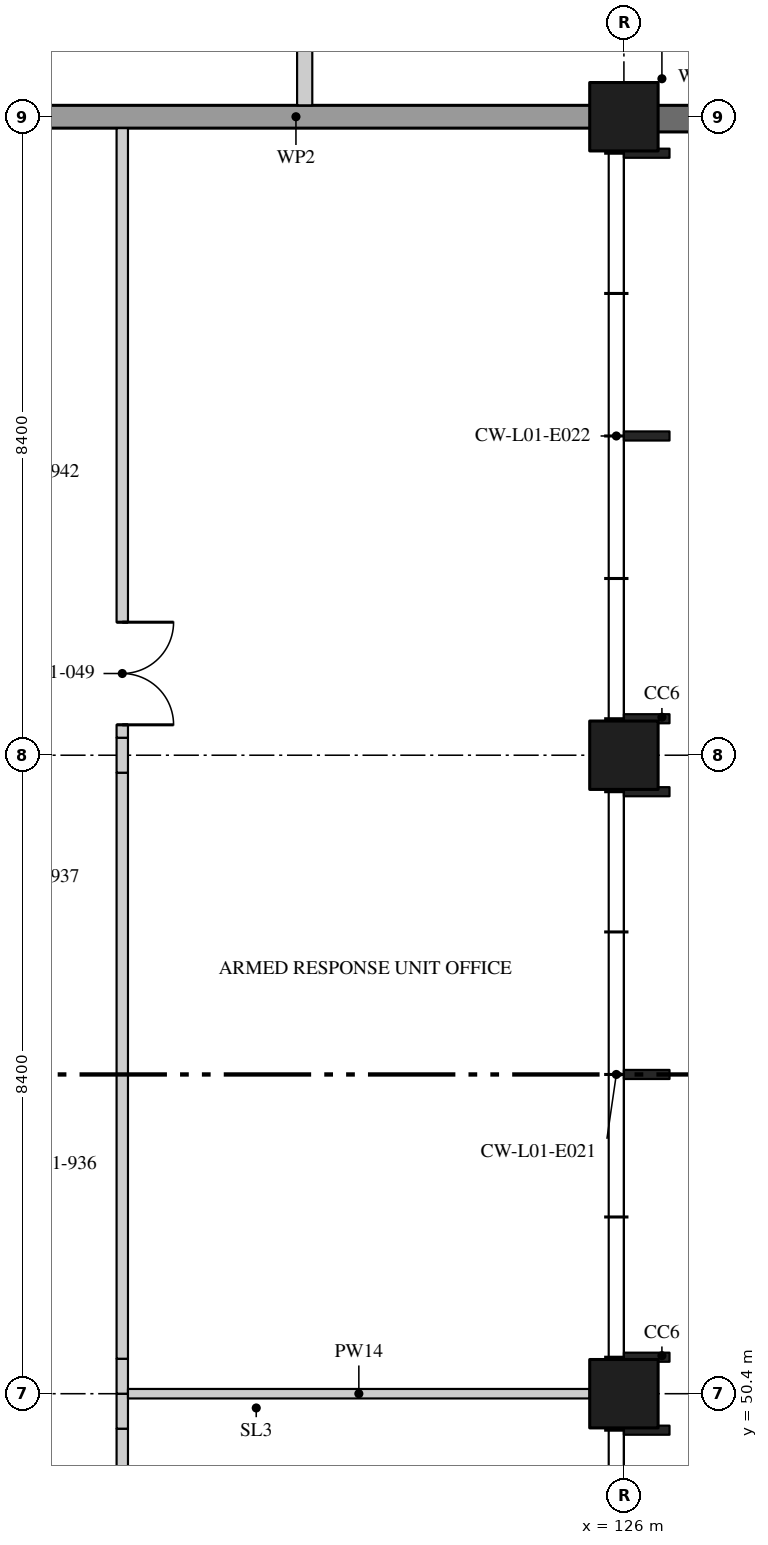
"""IFC4 building model, lengths in metres.
Left out: names, types, materials, properties, quantities, classifications, styles, units other than length and angle.
Written with IfcOpenShell. Run it as: python <this file> out.ifc"""

import sys

from ifc_helpers import new_model, si_unit, direction, frame, frame_2d, origin, origin_2d, place, context, subcontext, project, spatial, rectangle, extrude, element, fill, save


model = new_model("IFC4")
c1 = context("Model", 3, precision=1e-05, world=origin(), true_north=direction((0.0, 1.0)))
c2 = subcontext(c1, "Body", "Model", "MODEL_VIEW")
j1 = project(units=[si_unit("LENGTHUNIT", "METRE"), si_unit("PLANEANGLEUNIT", "RADIAN")], contexts=[c1])
p1 = place(None, origin())
s1 = spatial("IfcSite", under=j1, at=p1, CompositionType="ELEMENT")
p2 = place(p1, origin())
s2 = spatial("IfcBuilding", under=s1, at=p2, CompositionType="ELEMENT")
p3 = place(p2, frame((0.0, 0.0, 5.4)))
s3 = spatial("IfcBuildingStorey", under=s2, at=p3, CompositionType="ELEMENT", Elevation=5.4)
for number, where, z_axis, x_axis in (
    (1, (126.0, 50.4, 0.0), (0.0, 0.0, 1.0), (1.0, 0.0, 0.0)),
    (2, (126.0, 58.8, 0.0), (0.0, 0.0, 1.0), (1.0, 0.0, 0.0)),
    (3, (126.0, 67.2, 0.0), (0.0, 0.0, 1.0), (1.0, 0.0, 0.0)),
):
    element("IfcColumn", number, at=place(p3, frame(where, z_axis=z_axis, x_axis=x_axis)), inside=s3, PredefinedType="COLUMN", context=c2, shape_type="SweptSolid", body=[
        extrude(rectangle(XDim=0.9, YDim=0.9, at=origin_2d()), origin(), (0.0, 0.0, 1.0), 4.37),
    ])
p4 = place(p3, frame((119.4, 42.23, 0.0), z_axis=(0.0, 0.0, 1.0), x_axis=(0.0, 1.0, 0.0)))
e4 = element("IfcWall", 4, at=p4, inside=s3, PredefinedType="PARTITIONING", context=c2, shape_type="SweptSolid", body=[
    extrude(rectangle(XDim=7.71, YDim=0.15, at=frame_2d((3.855, 0.0))), origin(), (0.0, 0.0, 1.0), 4.37),
])
p5 = place(p3, frame((119.4, 49.94, 0.0), z_axis=(0.0, 0.0, 1.0), x_axis=(0.0, 1.0, 0.0)))
e5 = element("IfcWall", 5, at=p5, inside=s3, PredefinedType="PARTITIONING", context=c2, shape_type="SweptSolid", body=[
    extrude(rectangle(XDim=0.46, YDim=0.15, at=frame_2d((0.23, 0.0))), origin(), (0.0, 0.0, 1.0), 3.746),
])
p6 = place(p3, frame((119.4, 50.4, 0.0), z_axis=(0.0, 0.0, 1.0), x_axis=(0.0, 1.0, 0.0)))
e6 = element("IfcWall", 6, at=p6, inside=s3, PredefinedType="PARTITIONING", context=c2, shape_type="SweptSolid", body=[
    extrude(rectangle(XDim=0.46, YDim=0.15, at=frame_2d((0.23, 0.0))), origin(), (0.0, 0.0, 1.0), 3.746),
])
p7 = place(p3, frame((119.4, 50.86, 0.0), z_axis=(0.0, 0.0, 1.0), x_axis=(0.0, 1.0, 0.0)))
e7 = element("IfcWall", 7, at=p7, inside=s3, PredefinedType="PARTITIONING", context=c2, shape_type="SweptSolid", body=[
    extrude(rectangle(XDim=7.71, YDim=0.15, at=frame_2d((3.855, 0.0))), origin(), (0.0, 0.0, 1.0), 4.37),
])
p8 = place(p3, frame((119.4, 58.57, 0.0), z_axis=(0.0, 0.0, 1.0), x_axis=(0.0, 1.0, 0.0)))
e8 = element("IfcWall", 8, at=p8, inside=s3, PredefinedType="PARTITIONING", context=c2, shape_type="SweptSolid", body=[
    extrude(rectangle(XDim=0.46, YDim=0.15, at=frame_2d((0.23, 0.0))), origin(), (0.0, 0.0, 1.0), 3.746),
])
p9 = place(p3, frame((119.4, 59.03, 0.0), z_axis=(0.0, 0.0, 1.0), x_axis=(0.0, 1.0, 0.0)))
e9 = element("IfcWall", 9, at=p9, inside=s3, PredefinedType="PARTITIONING", context=c2, shape_type="SweptSolid", body=[
    extrude(rectangle(XDim=8.02, YDim=0.15, at=frame_2d((4.01, 0.0))), origin(), (0.0, 0.0, 1.0), 4.37),
])
p10 = place(p9, frame((0.17, 0.0, 0.0)))
e10 = element("IfcOpeningElement", 10, at=p10, cuts=e9, PredefinedType="OPENING", context=c2, shape_type="SweptSolid", body=[
    extrude(rectangle(XDim=1.35, YDim=2.1, at=frame_2d((0.675, 1.05))), frame((0.0, 0.085, 0.0), z_axis=(0.0, -1.0, 0.0), x_axis=(1.0, 0.0, 0.0)), (0.0, 0.0, 1.0), 0.17),
])
p11 = place(p3, frame((119.475, 50.4, 0.0), z_axis=(0.0, 0.0, 1.0), x_axis=(1.0, 0.0, 0.0)))
e11 = element("IfcWall", 11, at=p11, inside=s3, PredefinedType="PARTITIONING", context=c2, shape_type="SweptSolid", body=[
    extrude(rectangle(XDim=6.075, YDim=0.125, at=frame_2d((3.038, 0.0))), origin(), (0.0, 0.0, 1.0), 3.746),
])
p12 = place(p3, frame((121.8, 67.35, 0.0), z_axis=(0.0, 0.0, 1.0), x_axis=(0.0, 1.0, 0.0)))
e12 = element("IfcWall", 12, at=p12, inside=s3, PredefinedType="PARTITIONING", context=c2, shape_type="SweptSolid", body=[
    extrude(rectangle(XDim=6.65, YDim=0.2, at=frame_2d((3.325, 0.0))), origin(), (0.0, 0.0, 1.0), 4.37),
])
p13 = place(p3, frame((126.43, 67.175, 0.0), z_axis=(0.0, 0.0, 1.0), x_axis=(1.0, 0.0, 0.0)))
e13 = element("IfcWall", 13, at=p13, inside=s3, PredefinedType="SOLIDWALL", context=c2, shape_type="SweptSolid", body=[
    extrude(rectangle(XDim=7.59, YDim=0.35, at=frame_2d((3.795, 0.0))), origin(), (0.0, 0.0, 1.0), 3.746),
])
p14 = place(p13, frame((0.47, 0.0, 1.5)))
e14 = element("IfcOpeningElement", 14, at=p14, cuts=e13, PredefinedType="OPENING", context=c2, shape_type="SweptSolid", body=[
    extrude(rectangle(XDim=0.3, YDim=1.5, at=frame_2d((0.15, 0.75))), frame((0.0, 0.185, 0.0), z_axis=(0.0, -1.0, 0.0), x_axis=(1.0, 0.0, 0.0)), (0.0, 0.0, 1.0), 0.37),
])
p15 = place(p13, frame((2.12, 0.0, 1.5)))
e15 = element("IfcOpeningElement", 15, at=p15, cuts=e13, PredefinedType="OPENING", context=c2, shape_type="SweptSolid", body=[
    extrude(rectangle(XDim=1.2, YDim=1.5, at=frame_2d((0.6, 0.75))), frame((0.0, 0.185, 0.0), z_axis=(0.0, -1.0, 0.0), x_axis=(1.0, 0.0, 0.0)), (0.0, 0.0, 1.0), 0.37),
])
p16 = place(p13, frame((4.07, 0.0, 1.5)))
e16 = element("IfcOpeningElement", 16, at=p16, cuts=e13, PredefinedType="OPENING", context=c2, shape_type="SweptSolid", body=[
    extrude(rectangle(XDim=1.5, YDim=1.5, at=frame_2d((0.75, 0.75))), frame((0.0, 0.185, 0.0), z_axis=(0.0, -1.0, 0.0), x_axis=(1.0, 0.0, 0.0)), (0.0, 0.0, 1.0), 0.37),
])
p17 = place(p3, frame((125.57, 67.2, 0.0), z_axis=(0.0, 0.0, 1.0), x_axis=(-1.0, 0.0, 0.0)))
e17 = element("IfcWall", 17, at=p17, inside=s3, PredefinedType="SOLIDWALL", context=c2, shape_type="SweptSolid", body=[
    extrude(rectangle(XDim=7.77, YDim=0.3, at=frame_2d((3.885, 0.0))), origin(), (0.0, 0.0, 1.0), 3.746),
])
p18 = place(p10, frame((1.35, 0.0, 0.0), z_axis=(0.0, 0.0, 1.0), x_axis=(-1.0, 0.0, 0.0)))
e18 = element("IfcDoor", 18, at=p18, inside=s3, OperationType="DOUBLE_DOOR_SINGLE_SWING", PredefinedType="DOOR", context=c2, shape_type="SweptSolid", body=[
    extrude(rectangle(XDim=1.35, YDim=2.1, at=frame_2d((0.675, 1.05))), frame((0.0, 0.025, 0.0), z_axis=(0.0, -1.0, 0.0), x_axis=(1.0, 0.0, 0.0)), (0.0, 0.0, 1.0), 0.05),
])
fill(e10, e18)
save(model, sys.argv[1])
